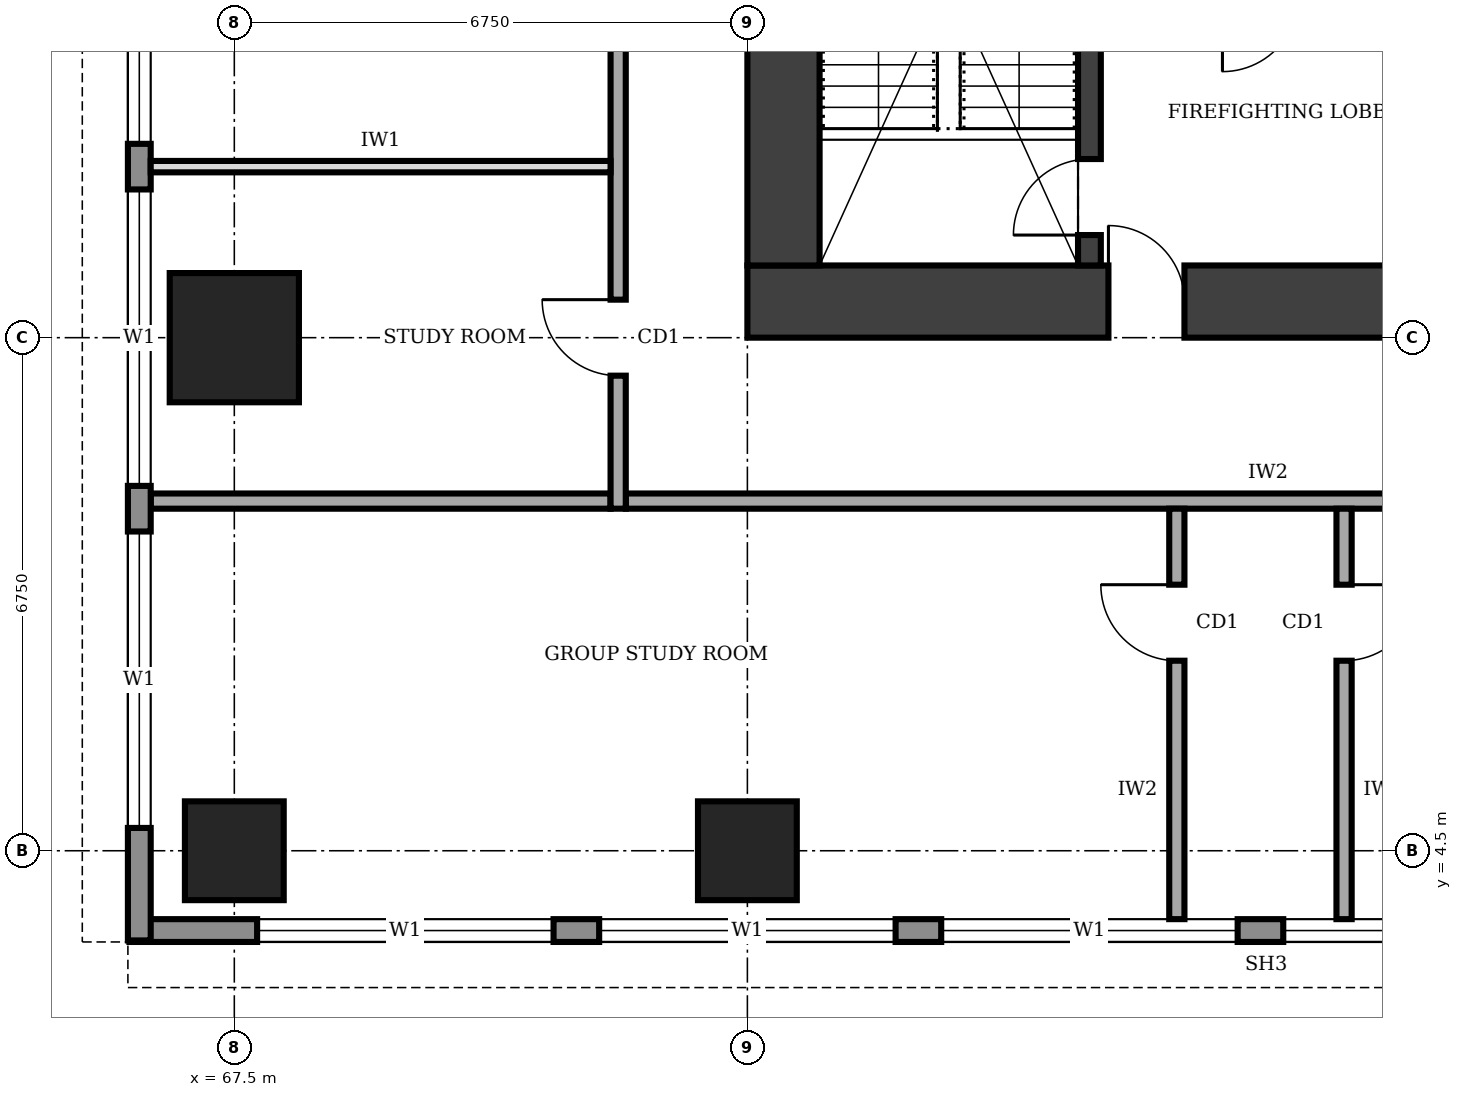
"""IFC4 building model, lengths in metres.
Left out: names, types, materials, properties, quantities, classifications, styles, units other than length and angle.
Written with IfcOpenShell. Run it as: python <this file> out.ifc"""

import sys

from ifc_helpers import new_model, si_unit, direction, frame, frame_2d, origin, origin_2d, place, context, subcontext, project, spatial, rectangle, extrude, element, fill, save


model = new_model("IFC4")
c1 = context("Model", 3, precision=1e-05, world=origin(), true_north=direction((0.0, 1.0)))
c2 = subcontext(c1, "Body", "Model", "MODEL_VIEW")
j1 = project(units=[si_unit("LENGTHUNIT", "METRE"), si_unit("PLANEANGLEUNIT", "RADIAN")], contexts=[c1])
p1 = place(None, origin())
s1 = spatial("IfcSite", under=j1, at=p1, CompositionType="ELEMENT")
p2 = place(p1, origin())
s2 = spatial("IfcBuilding", under=s1, at=p2, CompositionType="ELEMENT")
p3 = place(p2, frame((0.0, 0.0, 225.0)))
s3 = spatial("IfcBuildingStorey", under=s2, at=p3, CompositionType="ELEMENT", Elevation=225.0)
p4 = place(p3, frame((74.25, 11.725, 0.0), z_axis=(0.0, 0.0, 1.0), x_axis=(1.0, 0.0, 0.0)))
e1 = element("IfcWall", 1, at=p4, inside=s3, PredefinedType="SHEAR", context=c2, shape_type="SweptSolid", body=[
    extrude(rectangle(XDim=13.5, YDim=0.95, at=frame_2d((6.75, 0.0))), origin(), (0.0, 0.0, 1.0), 4.0),
])
p5 = place(p4, frame((4.75, 0.0, 0.0)))
e2 = element("IfcOpeningElement", 2, at=p5, cuts=e1, PredefinedType="OPENING", context=c2, shape_type="SweptSolid", body=[
    extrude(rectangle(XDim=1.0, YDim=2.1, at=frame_2d((0.5, 1.05))), frame((0.0, 0.485, 0.0), z_axis=(0.0, -1.0, 0.0), x_axis=(1.0, 0.0, 0.0)), (0.0, 0.0, 1.0), 0.97),
])
p6 = place(p3, frame((74.725, 28.3, 0.0), z_axis=(0.0, 0.0, 1.0), x_axis=(0.0, -1.0, 0.0)))
e3 = element("IfcWall", 3, at=p6, inside=s3, PredefinedType="SHEAR", context=c2, shape_type="SweptSolid", body=[
    extrude(rectangle(XDim=16.1, YDim=0.95, at=frame_2d((8.05, 0.0))), origin(), (0.0, 0.0, 1.0), 4.0),
])
p7 = place(p3, frame((78.75, 12.2, 0.0), z_axis=(0.0, 0.0, 1.0), x_axis=(0.0, 1.0, 0.0)))
e4 = element("IfcWall", 4, at=p7, inside=s3, PredefinedType="SHEAR", context=c2, shape_type="SweptSolid", body=[
    extrude(rectangle(XDim=16.1, YDim=0.3, at=frame_2d((8.05, 0.0))), origin(), (0.0, 0.0, 1.0), 4.0),
])
p8 = place(p7, frame((0.4, 0.0, 0.0)))
e5 = element("IfcOpeningElement", 5, at=p8, cuts=e4, PredefinedType="OPENING", context=c2, shape_type="SweptSolid", body=[
    extrude(rectangle(XDim=1.0, YDim=2.1, at=frame_2d((0.5, 1.05))), frame((0.0, 0.16, 0.0), z_axis=(0.0, -1.0, 0.0), x_axis=(1.0, 0.0, 0.0)), (0.0, 0.0, 1.0), 0.32),
])
p9 = place(p7, frame((14.6, 0.0, 0.0)))
e6 = element("IfcOpeningElement", 6, at=p9, cuts=e4, PredefinedType="OPENING", context=c2, shape_type="SweptSolid", body=[
    extrude(rectangle(XDim=1.1, YDim=2.1, at=frame_2d((0.55, 1.05))), frame((0.0, 0.16, 0.0), z_axis=(0.0, -1.0, 0.0), x_axis=(1.0, 0.0, 0.0)), (0.0, 0.0, 1.0), 0.32),
])
p10 = place(p7, frame((9.05, 0.0, 0.0)))
e7 = element("IfcOpeningElement", 7, at=p10, cuts=e4, PredefinedType="OPENING", context=c2, shape_type="SweptSolid", body=[
    extrude(rectangle(XDim=1.0, YDim=2.1, at=frame_2d((0.5, 1.05))), frame((0.0, 0.16, 0.0), z_axis=(0.0, -1.0, 0.0), x_axis=(1.0, 0.0, 0.0)), (0.0, 0.0, 1.0), 0.32),
])
p11 = place(p7, frame((12.05, 0.0, 0.0)))
e8 = element("IfcOpeningElement", 8, at=p11, cuts=e4, PredefinedType="OPENING", context=c2, shape_type="SweptSolid", body=[
    extrude(rectangle(XDim=1.0, YDim=2.1, at=frame_2d((0.5, 1.05))), frame((0.0, 0.16, 0.0), z_axis=(0.0, -1.0, 0.0), x_axis=(1.0, 0.0, 0.0)), (0.0, 0.0, 1.0), 0.32),
])
for number, where, z_axis, x_axis in (
    (9, (67.5, 4.5, 0.0), (0.0, 0.0, 1.0), (1.0, 0.0, 0.0)),
    (10, (74.25, 4.5, 0.0), (0.0, 0.0, 1.0), (1.0, 0.0, 0.0)),
):
    element("IfcColumn", number, at=place(p3, frame(where, z_axis=z_axis, x_axis=x_axis)), inside=s3, PredefinedType="COLUMN", context=c2, shape_type="SweptSolid", body=[
        extrude(rectangle(XDim=1.3, YDim=1.3, at=origin_2d()), origin(), (0.0, 0.0, 1.0), 4.0),
    ])
p12 = place(p3, frame((67.5, 11.25, 0.0), z_axis=(0.0, 0.0, 1.0), x_axis=(1.0, 0.0, 0.0)))
e11 = element("IfcColumn", 11, at=p12, inside=s3, PredefinedType="COLUMN", context=c2, shape_type="SweptSolid", body=[
    extrude(rectangle(XDim=1.7, YDim=1.7, at=origin_2d()), origin(), (0.0, 0.0, 1.0), 4.0),
])
p13 = place(p3, frame((66.12, 3.45, 0.0), z_axis=(0.0, 0.0, 1.0), x_axis=(1.0, 0.0, 0.0)))
e12 = element("IfcWall", 12, at=p13, inside=s3, PredefinedType="STANDARD", context=c2, shape_type="SweptSolid", body=[
    extrude(rectangle(XDim=29.91, YDim=0.3, at=frame_2d((14.955, 0.0))), origin(), (0.0, 0.0, 1.0), 3.75),
])
p14 = place(p13, frame((1.68, 0.0, 0.9)))
e13 = element("IfcOpeningElement", 13, at=p14, cuts=e12, PredefinedType="OPENING", context=c2, shape_type="SweptSolid", body=[
    extrude(rectangle(XDim=3.9, YDim=2.2, at=frame_2d((1.95, 1.1))), frame((0.0, 0.16, 0.0), z_axis=(0.0, -1.0, 0.0), x_axis=(1.0, 0.0, 0.0)), (0.0, 0.0, 1.0), 0.32),
])
p15 = place(p13, frame((6.18, 0.0, 0.9)))
e14 = element("IfcOpeningElement", 14, at=p15, cuts=e12, PredefinedType="OPENING", context=c2, shape_type="SweptSolid", body=[
    extrude(rectangle(XDim=3.9, YDim=2.2, at=frame_2d((1.95, 1.1))), frame((0.0, 0.16, 0.0), z_axis=(0.0, -1.0, 0.0), x_axis=(1.0, 0.0, 0.0)), (0.0, 0.0, 1.0), 0.32),
])
p16 = place(p13, frame((10.68, 0.0, 0.9)))
e15 = element("IfcOpeningElement", 15, at=p16, cuts=e12, PredefinedType="OPENING", context=c2, shape_type="SweptSolid", body=[
    extrude(rectangle(XDim=3.9, YDim=2.2, at=frame_2d((1.95, 1.1))), frame((0.0, 0.16, 0.0), z_axis=(0.0, -1.0, 0.0), x_axis=(1.0, 0.0, 0.0)), (0.0, 0.0, 1.0), 0.32),
])
p17 = place(p13, frame((15.18, 0.0, 0.9)))
e16 = element("IfcOpeningElement", 16, at=p17, cuts=e12, PredefinedType="OPENING", context=c2, shape_type="SweptSolid", body=[
    extrude(rectangle(XDim=3.9, YDim=2.2, at=frame_2d((1.95, 1.1))), frame((0.0, 0.16, 0.0), z_axis=(0.0, -1.0, 0.0), x_axis=(1.0, 0.0, 0.0)), (0.0, 0.0, 1.0), 0.32),
])
p18 = place(p13, frame((19.68, 0.0, 0.9)))
e17 = element("IfcOpeningElement", 17, at=p18, cuts=e12, PredefinedType="OPENING", context=c2, shape_type="SweptSolid", body=[
    extrude(rectangle(XDim=3.9, YDim=2.2, at=frame_2d((1.95, 1.1))), frame((0.0, 0.16, 0.0), z_axis=(0.0, -1.0, 0.0), x_axis=(1.0, 0.0, 0.0)), (0.0, 0.0, 1.0), 0.32),
])
p19 = place(p13, frame((24.18, 0.0, 0.9)))
e18 = element("IfcOpeningElement", 18, at=p19, cuts=e12, PredefinedType="OPENING", context=c2, shape_type="SweptSolid", body=[
    extrude(rectangle(XDim=3.9, YDim=2.2, at=frame_2d((1.95, 1.1))), frame((0.0, 0.16, 0.0), z_axis=(0.0, -1.0, 0.0), x_axis=(1.0, 0.0, 0.0)), (0.0, 0.0, 1.0), 0.32),
])
p20 = place(p3, frame((66.25, 37.18, 0.0), z_axis=(0.0, 0.0, 1.0), x_axis=(0.0, -1.0, 0.0)))
e19 = element("IfcWall", 19, at=p20, inside=s3, PredefinedType="STANDARD", context=c2, shape_type="SweptSolid", body=[
    extrude(rectangle(XDim=33.86, YDim=0.3, at=frame_2d((16.93, 0.0))), origin(), (0.0, 0.0, 1.0), 3.75),
])
p21 = place(p20, frame((28.48, 0.0, 0.9)))
e20 = element("IfcOpeningElement", 20, at=p21, cuts=e19, PredefinedType="OPENING", context=c2, shape_type="SweptSolid", body=[
    extrude(rectangle(XDim=3.9, YDim=2.2, at=frame_2d((1.95, 1.1))), frame((0.0, 0.16, 0.0), z_axis=(0.0, -1.0, 0.0), x_axis=(1.0, 0.0, 0.0)), (0.0, 0.0, 1.0), 0.32),
])
p22 = place(p20, frame((23.98, 0.0, 0.9)))
e21 = element("IfcOpeningElement", 21, at=p22, cuts=e19, PredefinedType="OPENING", context=c2, shape_type="SweptSolid", body=[
    extrude(rectangle(XDim=3.9, YDim=2.2, at=frame_2d((1.95, 1.1))), frame((0.0, 0.16, 0.0), z_axis=(0.0, -1.0, 0.0), x_axis=(1.0, 0.0, 0.0)), (0.0, 0.0, 1.0), 0.32),
])
p23 = place(p20, frame((19.48, 0.0, 0.9)))
e22 = element("IfcOpeningElement", 22, at=p23, cuts=e19, PredefinedType="OPENING", context=c2, shape_type="SweptSolid", body=[
    extrude(rectangle(XDim=3.9, YDim=2.2, at=frame_2d((1.95, 1.1))), frame((0.0, 0.16, 0.0), z_axis=(0.0, -1.0, 0.0), x_axis=(1.0, 0.0, 0.0)), (0.0, 0.0, 1.0), 0.32),
])
p24 = place(p20, frame((14.98, 0.0, 0.9)))
e23 = element("IfcOpeningElement", 23, at=p24, cuts=e19, PredefinedType="OPENING", context=c2, shape_type="SweptSolid", body=[
    extrude(rectangle(XDim=3.9, YDim=2.2, at=frame_2d((1.95, 1.1))), frame((0.0, 0.16, 0.0), z_axis=(0.0, -1.0, 0.0), x_axis=(1.0, 0.0, 0.0)), (0.0, 0.0, 1.0), 0.32),
])
p25 = place(p20, frame((10.48, 0.0, 0.9)))
e24 = element("IfcOpeningElement", 24, at=p25, cuts=e19, PredefinedType="OPENING", context=c2, shape_type="SweptSolid", body=[
    extrude(rectangle(XDim=3.9, YDim=2.2, at=frame_2d((1.95, 1.1))), frame((0.0, 0.16, 0.0), z_axis=(0.0, -1.0, 0.0), x_axis=(1.0, 0.0, 0.0)), (0.0, 0.0, 1.0), 0.32),
])
p26 = place(p20, frame((5.98, 0.0, 0.9)))
e25 = element("IfcOpeningElement", 25, at=p26, cuts=e19, PredefinedType="OPENING", context=c2, shape_type="SweptSolid", body=[
    extrude(rectangle(XDim=3.9, YDim=2.2, at=frame_2d((1.95, 1.1))), frame((0.0, 0.16, 0.0), z_axis=(0.0, -1.0, 0.0), x_axis=(1.0, 0.0, 0.0)), (0.0, 0.0, 1.0), 0.32),
])
p27 = place(p20, frame((1.48, 0.0, 0.9)))
e26 = element("IfcOpeningElement", 26, at=p27, cuts=e19, PredefinedType="OPENING", context=c2, shape_type="SweptSolid", body=[
    extrude(rectangle(XDim=3.9, YDim=2.2, at=frame_2d((1.95, 1.1))), frame((0.0, 0.16, 0.0), z_axis=(0.0, -1.0, 0.0), x_axis=(1.0, 0.0, 0.0)), (0.0, 0.0, 1.0), 0.32),
])
p28 = place(p3, frame((72.65, 9.1, 0.0), z_axis=(0.0, 0.0, 1.0), x_axis=(1.0, 0.0, 0.0)))
e27 = element("IfcWall", 27, at=p28, inside=s3, PredefinedType="SOLIDWALL", context=c2, shape_type="SweptSolid", body=[
    extrude(rectangle(XDim=16.9, YDim=0.2, at=frame_2d((8.45, 0.0))), origin(), (0.0, 0.0, 1.0), 3.75),
])
p29 = place(p3, frame((72.55, 32.8, 0.0), z_axis=(0.0, 0.0, 1.0), x_axis=(0.0, -1.0, 0.0)))
e28 = element("IfcWall", 28, at=p29, inside=s3, PredefinedType="SOLIDWALL", context=c2, shape_type="SweptSolid", body=[
    extrude(rectangle(XDim=23.8, YDim=0.2, at=frame_2d((11.9, 0.0))), origin(), (0.0, 0.0, 1.0), 3.75),
])
p30 = place(p29, frame((21.05, 0.0, 0.0)))
e29 = element("IfcOpeningElement", 29, at=p30, cuts=e28, PredefinedType="OPENING", context=c2, shape_type="SweptSolid", body=[
    extrude(rectangle(XDim=1.0, YDim=2.1, at=frame_2d((0.5, 1.05))), frame((0.0, 0.11, 0.0), z_axis=(0.0, -1.0, 0.0), x_axis=(1.0, 0.0, 0.0)), (0.0, 0.0, 1.0), 0.22),
])
p31 = place(p29, frame((14.3, 0.0, 0.0)))
e30 = element("IfcOpeningElement", 30, at=p31, cuts=e28, PredefinedType="OPENING", context=c2, shape_type="SweptSolid", body=[
    extrude(rectangle(XDim=1.0, YDim=2.1, at=frame_2d((0.5, 1.05))), frame((0.0, 0.11, 0.0), z_axis=(0.0, -1.0, 0.0), x_axis=(1.0, 0.0, 0.0)), (0.0, 0.0, 1.0), 0.22),
])
p32 = place(p29, frame((7.55, 0.0, 0.0)))
e31 = element("IfcOpeningElement", 31, at=p32, cuts=e28, PredefinedType="OPENING", context=c2, shape_type="SweptSolid", body=[
    extrude(rectangle(XDim=1.0, YDim=2.1, at=frame_2d((0.5, 1.05))), frame((0.0, 0.11, 0.0), z_axis=(0.0, -1.0, 0.0), x_axis=(1.0, 0.0, 0.0)), (0.0, 0.0, 1.0), 0.22),
])
p33 = place(p29, frame((2.3, 0.0, 0.0)))
e32 = element("IfcOpeningElement", 32, at=p33, cuts=e28, PredefinedType="OPENING", context=c2, shape_type="SweptSolid", body=[
    extrude(rectangle(XDim=1.0, YDim=2.1, at=frame_2d((0.5, 1.05))), frame((0.0, 0.11, 0.0), z_axis=(0.0, -1.0, 0.0), x_axis=(1.0, 0.0, 0.0)), (0.0, 0.0, 1.0), 0.22),
])
p34 = place(p3, frame((79.9, 3.6, 0.0), z_axis=(0.0, 0.0, 1.0), x_axis=(0.0, 1.0, 0.0)))
e33 = element("IfcWall", 33, at=p34, inside=s3, PredefinedType="SOLIDWALL", context=c2, shape_type="SweptSolid", body=[
    extrude(rectangle(XDim=5.4, YDim=0.2, at=frame_2d((2.7, 0.0))), origin(), (0.0, 0.0, 1.0), 3.75),
])
p35 = place(p34, frame((3.4, 0.0, 0.0)))
e34 = element("IfcOpeningElement", 34, at=p35, cuts=e33, PredefinedType="OPENING", context=c2, shape_type="SweptSolid", body=[
    extrude(rectangle(XDim=1.0, YDim=2.1, at=frame_2d((0.5, 1.05))), frame((0.0, 0.11, 0.0), z_axis=(0.0, -1.0, 0.0), x_axis=(1.0, 0.0, 0.0)), (0.0, 0.0, 1.0), 0.22),
])
p36 = place(p3, frame((82.1, 9.0, 0.0), z_axis=(0.0, 0.0, 1.0), x_axis=(0.0, -1.0, 0.0)))
e35 = element("IfcWall", 35, at=p36, inside=s3, PredefinedType="SOLIDWALL", context=c2, shape_type="SweptSolid", body=[
    extrude(rectangle(XDim=5.4, YDim=0.2, at=frame_2d((2.7, 0.0))), origin(), (0.0, 0.0, 1.0), 3.75),
])
p37 = place(p36, frame((1.0, 0.0, 0.0)))
e36 = element("IfcOpeningElement", 36, at=p37, cuts=e35, PredefinedType="OPENING", context=c2, shape_type="SweptSolid", body=[
    extrude(rectangle(XDim=1.0, YDim=2.1, at=frame_2d((0.5, 1.05))), frame((0.0, 0.11, 0.0), z_axis=(0.0, -1.0, 0.0), x_axis=(1.0, 0.0, 0.0)), (0.0, 0.0, 1.0), 0.22),
])
p38 = place(p3, frame((66.4, 9.1, 0.0), z_axis=(0.0, 0.0, 1.0), x_axis=(1.0, 0.0, 0.0)))
e37 = element("IfcWall", 37, at=p38, inside=s3, PredefinedType="SOLIDWALL", context=c2, shape_type="SweptSolid", body=[
    extrude(rectangle(XDim=6.05, YDim=0.2, at=frame_2d((3.025, 0.0))), origin(), (0.0, 0.0, 1.0), 3.75),
])
p39 = place(p3, frame((66.4, 13.5, 0.0), z_axis=(0.0, 0.0, 1.0), x_axis=(1.0, 0.0, 0.0)))
e38 = element("IfcWall", 38, at=p39, inside=s3, PredefinedType="PARTITIONING", context=c2, shape_type="SweptSolid", body=[
    extrude(rectangle(XDim=6.05, YDim=0.15, at=frame_2d((3.025, 0.0))), origin(), (0.0, 0.0, 1.0), 3.75),
])
p40 = place(p14, origin())
e39 = element("IfcWindow", 39, at=p40, inside=s3, PartitioningType="SINGLE_PANEL", PredefinedType="WINDOW", context=c2, shape_type="SweptSolid", body=[
    extrude(rectangle(XDim=3.9, YDim=2.2, at=frame_2d((1.95, 1.1))), frame((0.0, 0.03, 0.0), z_axis=(0.0, -1.0, 0.0), x_axis=(1.0, 0.0, 0.0)), (0.0, 0.0, 1.0), 0.06),
])
fill(e13, e39)
p41 = place(p15, origin())
e40 = element("IfcWindow", 40, at=p41, inside=s3, PartitioningType="SINGLE_PANEL", PredefinedType="WINDOW", context=c2, shape_type="SweptSolid", body=[
    extrude(rectangle(XDim=3.9, YDim=2.2, at=frame_2d((1.95, 1.1))), frame((0.0, 0.03, 0.0), z_axis=(0.0, -1.0, 0.0), x_axis=(1.0, 0.0, 0.0)), (0.0, 0.0, 1.0), 0.06),
])
fill(e14, e40)
p42 = place(p16, origin())
e41 = element("IfcWindow", 41, at=p42, inside=s3, PartitioningType="SINGLE_PANEL", PredefinedType="WINDOW", context=c2, shape_type="SweptSolid", body=[
    extrude(rectangle(XDim=3.9, YDim=2.2, at=frame_2d((1.95, 1.1))), frame((0.0, 0.03, 0.0), z_axis=(0.0, -1.0, 0.0), x_axis=(1.0, 0.0, 0.0)), (0.0, 0.0, 1.0), 0.06),
])
fill(e15, e41)
p43 = place(p17, origin())
e42 = element("IfcWindow", 42, at=p43, inside=s3, PartitioningType="SINGLE_PANEL", PredefinedType="WINDOW", context=c2, shape_type="SweptSolid", body=[
    extrude(rectangle(XDim=3.9, YDim=2.2, at=frame_2d((1.95, 1.1))), frame((0.0, 0.03, 0.0), z_axis=(0.0, -1.0, 0.0), x_axis=(1.0, 0.0, 0.0)), (0.0, 0.0, 1.0), 0.06),
])
fill(e16, e42)
p44 = place(p21, origin())
e43 = element("IfcWindow", 43, at=p44, inside=s3, PartitioningType="SINGLE_PANEL", PredefinedType="WINDOW", context=c2, shape_type="SweptSolid", body=[
    extrude(rectangle(XDim=3.9, YDim=2.2, at=frame_2d((1.95, 1.1))), frame((0.0, 0.03, 0.0), z_axis=(0.0, -1.0, 0.0), x_axis=(1.0, 0.0, 0.0)), (0.0, 0.0, 1.0), 0.06),
])
fill(e20, e43)
p45 = place(p22, origin())
e44 = element("IfcWindow", 44, at=p45, inside=s3, PartitioningType="SINGLE_PANEL", PredefinedType="WINDOW", context=c2, shape_type="SweptSolid", body=[
    extrude(rectangle(XDim=3.9, YDim=2.2, at=frame_2d((1.95, 1.1))), frame((0.0, 0.03, 0.0), z_axis=(0.0, -1.0, 0.0), x_axis=(1.0, 0.0, 0.0)), (0.0, 0.0, 1.0), 0.06),
])
fill(e21, e44)
p46 = place(p23, origin())
e45 = element("IfcWindow", 45, at=p46, inside=s3, PartitioningType="SINGLE_PANEL", PredefinedType="WINDOW", context=c2, shape_type="SweptSolid", body=[
    extrude(rectangle(XDim=3.9, YDim=2.2, at=frame_2d((1.95, 1.1))), frame((0.0, 0.03, 0.0), z_axis=(0.0, -1.0, 0.0), x_axis=(1.0, 0.0, 0.0)), (0.0, 0.0, 1.0), 0.06),
])
fill(e22, e45)
p47 = place(p5, origin())
e46 = element("IfcDoor", 46, at=p47, inside=s3, OperationType="SINGLE_SWING_LEFT", PredefinedType="DOOR", context=c2, shape_type="SweptSolid", body=[
    extrude(rectangle(XDim=1.0, YDim=2.1, at=frame_2d((0.5, 1.05))), frame((0.0, 0.025, 0.0), z_axis=(0.0, -1.0, 0.0), x_axis=(1.0, 0.0, 0.0)), (0.0, 0.0, 1.0), 0.05),
])
fill(e2, e46)
p48 = place(p8, origin())
e47 = element("IfcDoor", 47, at=p48, inside=s3, OperationType="SINGLE_SWING_LEFT", PredefinedType="DOOR", context=c2, shape_type="SweptSolid", body=[
    extrude(rectangle(XDim=1.0, YDim=2.1, at=frame_2d((0.5, 1.05))), frame((0.0, 0.025, 0.0), z_axis=(0.0, -1.0, 0.0), x_axis=(1.0, 0.0, 0.0)), (0.0, 0.0, 1.0), 0.05),
])
fill(e5, e47)
p49 = place(p30, frame((1.0, 0.0, 0.0), z_axis=(0.0, 0.0, 1.0), x_axis=(-1.0, 0.0, 0.0)))
e48 = element("IfcDoor", 48, at=p49, inside=s3, OperationType="SINGLE_SWING_RIGHT", PredefinedType="DOOR", context=c2, shape_type="SweptSolid", body=[
    extrude(rectangle(XDim=1.0, YDim=2.1, at=frame_2d((0.5, 1.05))), frame((0.0, 0.025, 0.0), z_axis=(0.0, -1.0, 0.0), x_axis=(1.0, 0.0, 0.0)), (0.0, 0.0, 1.0), 0.05),
])
fill(e29, e48)
p50 = place(p35, origin())
e49 = element("IfcDoor", 49, at=p50, inside=s3, OperationType="SINGLE_SWING_RIGHT", PredefinedType="DOOR", context=c2, shape_type="SweptSolid", body=[
    extrude(rectangle(XDim=1.0, YDim=2.1, at=frame_2d((0.5, 1.05))), frame((0.0, 0.025, 0.0), z_axis=(0.0, -1.0, 0.0), x_axis=(1.0, 0.0, 0.0)), (0.0, 0.0, 1.0), 0.05),
])
fill(e34, e49)
p51 = place(p37, origin())
e50 = element("IfcDoor", 50, at=p51, inside=s3, OperationType="SINGLE_SWING_LEFT", PredefinedType="DOOR", context=c2, shape_type="SweptSolid", body=[
    extrude(rectangle(XDim=1.0, YDim=2.1, at=frame_2d((0.5, 1.05))), frame((0.0, 0.025, 0.0), z_axis=(0.0, -1.0, 0.0), x_axis=(1.0, 0.0, 0.0)), (0.0, 0.0, 1.0), 0.05),
])
fill(e36, e50)
save(model, sys.argv[1])
